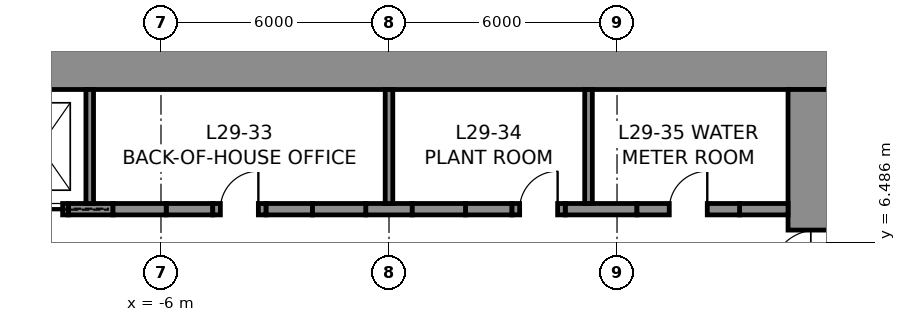
"""IFC4 building model, lengths in metres.
Left out: names, types, materials, properties, quantities, classifications, styles, units other than length and angle.
Written with IfcOpenShell. Run it as: python <this file> out.ifc"""

import sys

from ifc_helpers import new_model, si_unit, direction, frame, frame_2d, origin, place, context, subcontext, project, spatial, rectangle, extrude, element, fill, save


model = new_model("IFC4")
c1 = context("Model", 3, precision=1e-05, world=origin(), true_north=direction((0.0, 1.0)))
c2 = subcontext(c1, "Body", "Model", "MODEL_VIEW")
j1 = project(units=[si_unit("LENGTHUNIT", "METRE"), si_unit("PLANEANGLEUNIT", "RADIAN")], contexts=[c1])
p1 = place(None, origin())
s1 = spatial("IfcSite", under=j1, at=p1, CompositionType="ELEMENT")
p2 = place(p1, origin())
s2 = spatial("IfcBuilding", under=s1, at=p2, CompositionType="ELEMENT")
p3 = place(p2, frame((0.0, 0.0, 143.8)))
s3 = spatial("IfcBuildingStorey", under=s2, at=p3, CompositionType="ELEMENT", Elevation=143.8)
p4 = place(p3, frame((-12.0, 11.25, 0.0), z_axis=(0.0, 0.0, 1.0), x_axis=(1.0, 0.0, 0.0)))
e1 = element("IfcWall", 1, at=p4, inside=s3, PredefinedType="SHEAR", context=c2, shape_type="SweptSolid", body=[
    extrude(rectangle(XDim=24.0, YDim=1.5, at=frame_2d((12.0, 0.0))), origin(), (0.0, 0.0, 1.0), 4.0),
])
p5 = place(p3, frame((11.25, 10.5, 0.0), z_axis=(0.0, 0.0, 1.0), x_axis=(0.0, -1.0, 0.0)))
e2 = element("IfcWall", 2, at=p5, inside=s3, PredefinedType="SHEAR", context=c2, shape_type="SweptSolid", body=[
    extrude(rectangle(XDim=21.0, YDim=1.5, at=frame_2d((10.5, 0.0))), origin(), (0.0, 0.0, 1.0), 4.0),
])
p6 = place(p5, frame((3.7, 0.0, 0.0)))
e3 = element("IfcOpeningElement", 3, at=p6, cuts=e2, PredefinedType="OPENING", context=c2, shape_type="SweptSolid", body=[
    extrude(rectangle(XDim=1.2, YDim=2.3, at=frame_2d((0.6, 1.15))), frame((0.0, 0.76, 0.0), z_axis=(0.0, -1.0, 0.0), x_axis=(1.0, 0.0, 0.0)), (0.0, 0.0, 1.0), 1.52),
])
p7 = place(p5, frame((16.1, 0.0, 0.0)))
e4 = element("IfcOpeningElement", 4, at=p7, cuts=e2, PredefinedType="OPENING", context=c2, shape_type="SweptSolid", body=[
    extrude(rectangle(XDim=1.2, YDim=2.3, at=frame_2d((0.6, 1.15))), frame((0.0, 0.76, 0.0), z_axis=(0.0, -1.0, 0.0), x_axis=(1.0, 0.0, 0.0)), (0.0, 0.0, 1.0), 1.52),
])
p8 = place(p3, frame((-8.438, 7.35, 0.0), z_axis=(0.0, 0.0, 1.0), x_axis=(1.0, 0.0, 0.0)))
e5 = element("IfcWall", 5, at=p8, inside=s3, PredefinedType="SHEAR", context=c2, shape_type="SweptSolid", body=[
    extrude(rectangle(XDim=1.175, YDim=0.3, at=frame_2d((0.587, 0.0))), origin(), (0.0, 0.0, 1.0), 4.0),
])
for number, where, z_axis, x_axis in (
    (6, (-5.863, 7.35, 0.0), (0.0, 0.0, 1.0), (1.0, 0.0, 0.0)),
    (7, (-3.238, 7.35, 0.0), (0.0, 0.0, 1.0), (1.0, 0.0, 0.0)),
    (8, (-0.613, 7.35, 0.0), (0.0, 0.0, 1.0), (1.0, 0.0, 0.0)),
    (9, (2.012, 7.35, 0.0), (0.0, 0.0, 1.0), (1.0, 0.0, 0.0)),
):
    element("IfcWall", number, at=place(p3, frame(where, z_axis=z_axis, x_axis=x_axis)), inside=s3, PredefinedType="SHEAR", context=c2, shape_type="SweptSolid", body=[
        extrude(rectangle(XDim=1.225, YDim=0.3, at=frame_2d((0.613, 0.0))), origin(), (0.0, 0.0, 1.0), 4.0),
    ])
p9 = place(p3, frame((4.637, 7.35, 0.0), z_axis=(0.0, 0.0, 1.0), x_axis=(1.0, 0.0, 0.0)))
e10 = element("IfcWall", 10, at=p9, inside=s3, PredefinedType="SHEAR", context=c2, shape_type="SweptSolid", body=[
    extrude(rectangle(XDim=1.887, YDim=0.3, at=frame_2d((0.944, 0.0))), origin(), (0.0, 0.0, 1.0), 4.0),
])
p10 = place(p3, frame((9.225, 7.35, 0.0), z_axis=(0.0, 0.0, 1.0), x_axis=(1.0, 0.0, 0.0)))
e11 = element("IfcWall", 11, at=p10, inside=s3, PredefinedType="SHEAR", context=c2, shape_type="SweptSolid", body=[
    extrude(rectangle(XDim=1.275, YDim=0.3, at=frame_2d((0.637, 0.0))), origin(), (0.0, 0.0, 1.0), 4.0),
])
p11 = place(p3, frame((-9.938, 7.35, 0.0), z_axis=(0.0, 0.0, 1.0), x_axis=(1.0, 0.0, 0.0)))
e12 = element("IfcWall", 12, at=p11, inside=s3, PredefinedType="PARTITIONING", context=c2, shape_type="SweptSolid", body=[
    extrude(rectangle(XDim=1.5, YDim=0.3, at=frame_2d((0.75, 0.0))), origin(), (0.0, 0.0, 1.0), 4.0),
])
p12 = place(p11, frame((0.15, 0.0, 0.0)))
e13 = element("IfcOpeningElement", 13, at=p12, cuts=e12, PredefinedType="OPENING", context=c2, shape_type="SweptSolid", body=[
    extrude(rectangle(XDim=1.2, YDim=2.3, at=frame_2d((0.6, 1.15))), frame((0.0, 0.16, 0.0), z_axis=(0.0, -1.0, 0.0), x_axis=(1.0, 0.0, 0.0)), (0.0, 0.0, 1.0), 0.32),
])
p13 = place(p3, frame((-7.262, 7.35, 0.0), z_axis=(0.0, 0.0, 1.0), x_axis=(1.0, 0.0, 0.0)))
e14 = element("IfcWall", 14, at=p13, inside=s3, PredefinedType="PARTITIONING", context=c2, shape_type="SweptSolid", body=[
    extrude(rectangle(XDim=1.4, YDim=0.3, at=frame_2d((0.7, 0.0))), origin(), (0.0, 0.0, 1.0), 4.0),
])
p14 = place(p3, frame((-4.637, 7.35, 0.0), z_axis=(0.0, 0.0, 1.0), x_axis=(1.0, 0.0, 0.0)))
e15 = element("IfcWall", 15, at=p14, inside=s3, PredefinedType="PARTITIONING", context=c2, shape_type="SweptSolid", body=[
    extrude(rectangle(XDim=1.4, YDim=0.3, at=frame_2d((0.7, 0.0))), origin(), (0.0, 0.0, 1.0), 4.0),
])
p15 = place(p14, frame((0.2, 0.0, 0.0)))
e16 = element("IfcOpeningElement", 16, at=p15, cuts=e15, PredefinedType="OPENING", context=c2, shape_type="SweptSolid", body=[
    extrude(rectangle(XDim=1.0, YDim=2.3, at=frame_2d((0.5, 1.15))), frame((0.0, 0.16, 0.0), z_axis=(0.0, -1.0, 0.0), x_axis=(1.0, 0.0, 0.0)), (0.0, 0.0, 1.0), 0.32),
])
for number, where, z_axis, x_axis in (
    (17, (-2.012, 7.35, 0.0), (0.0, 0.0, 1.0), (1.0, 0.0, 0.0)),
    (18, (0.613, 7.35, 0.0), (0.0, 0.0, 1.0), (1.0, 0.0, 0.0)),
):
    element("IfcWall", number, at=place(p3, frame(where, z_axis=z_axis, x_axis=x_axis)), inside=s3, PredefinedType="PARTITIONING", context=c2, shape_type="SweptSolid", body=[
        extrude(rectangle(XDim=1.4, YDim=0.3, at=frame_2d((0.7, 0.0))), origin(), (0.0, 0.0, 1.0), 4.0),
    ])
p16 = place(p3, frame((3.238, 7.35, 0.0), z_axis=(0.0, 0.0, 1.0), x_axis=(1.0, 0.0, 0.0)))
e19 = element("IfcWall", 19, at=p16, inside=s3, PredefinedType="PARTITIONING", context=c2, shape_type="SweptSolid", body=[
    extrude(rectangle(XDim=1.4, YDim=0.3, at=frame_2d((0.7, 0.0))), origin(), (0.0, 0.0, 1.0), 4.0),
])
p17 = place(p16, frame((0.2, 0.0, 0.0)))
e20 = element("IfcOpeningElement", 20, at=p17, cuts=e19, PredefinedType="OPENING", context=c2, shape_type="SweptSolid", body=[
    extrude(rectangle(XDim=1.0, YDim=2.3, at=frame_2d((0.5, 1.15))), frame((0.0, 0.16, 0.0), z_axis=(0.0, -1.0, 0.0), x_axis=(1.0, 0.0, 0.0)), (0.0, 0.0, 1.0), 0.32),
])
p18 = place(p3, frame((6.525, 7.35, 0.0), z_axis=(0.0, 0.0, 1.0), x_axis=(1.0, 0.0, 0.0)))
e21 = element("IfcWall", 21, at=p18, inside=s3, PredefinedType="PARTITIONING", context=c2, shape_type="SweptSolid", body=[
    extrude(rectangle(XDim=2.7, YDim=0.3, at=frame_2d((1.35, 0.0))), origin(), (0.0, 0.0, 1.0), 4.0),
])
p19 = place(p18, frame((0.85, 0.0, 0.0)))
e22 = element("IfcOpeningElement", 22, at=p19, cuts=e21, PredefinedType="OPENING", context=c2, shape_type="SweptSolid", body=[
    extrude(rectangle(XDim=1.0, YDim=2.3, at=frame_2d((0.5, 1.15))), frame((0.0, 0.16, 0.0), z_axis=(0.0, -1.0, 0.0), x_axis=(1.0, 0.0, 0.0)), (0.0, 0.0, 1.0), 0.32),
])
for number, where, z_axis, x_axis in (
    (23, (-7.875, 7.5, 0.0), (0.0, 0.0, 1.0), (0.0, 1.0, 0.0)),
    (24, (0.0, 7.5, 0.0), (0.0, 0.0, 1.0), (0.0, 1.0, 0.0)),
    (25, (5.25, 7.5, 0.0), (0.0, 0.0, 1.0), (0.0, 1.0, 0.0)),
):
    element("IfcWall", number, at=place(p3, frame(where, z_axis=z_axis, x_axis=x_axis)), inside=s3, PredefinedType="PARTITIONING", context=c2, shape_type="SweptSolid", body=[
        extrude(rectangle(XDim=3.0, YDim=0.2, at=frame_2d((1.5, 0.0))), origin(), (0.0, 0.0, 1.0), 4.0),
    ])
p20 = place(p15, origin())
e26 = element("IfcDoor", 26, at=p20, inside=s3, OperationType="SINGLE_SWING_RIGHT", PredefinedType="DOOR", context=c2, shape_type="SweptSolid", body=[
    extrude(rectangle(XDim=1.0, YDim=2.3, at=frame_2d((0.5, 1.15))), frame((0.0, 0.025, 0.0), z_axis=(0.0, -1.0, 0.0), x_axis=(1.0, 0.0, 0.0)), (0.0, 0.0, 1.0), 0.05),
])
fill(e16, e26)
p21 = place(p17, origin())
e27 = element("IfcDoor", 27, at=p21, inside=s3, OperationType="SINGLE_SWING_RIGHT", PredefinedType="DOOR", context=c2, shape_type="SweptSolid", body=[
    extrude(rectangle(XDim=1.0, YDim=2.3, at=frame_2d((0.5, 1.15))), frame((0.0, 0.025, 0.0), z_axis=(0.0, -1.0, 0.0), x_axis=(1.0, 0.0, 0.0)), (0.0, 0.0, 1.0), 0.05),
])
fill(e20, e27)
p22 = place(p19, origin())
e28 = element("IfcDoor", 28, at=p22, inside=s3, OperationType="SINGLE_SWING_RIGHT", PredefinedType="DOOR", context=c2, shape_type="SweptSolid", body=[
    extrude(rectangle(XDim=1.0, YDim=2.3, at=frame_2d((0.5, 1.15))), frame((0.0, 0.025, 0.0), z_axis=(0.0, -1.0, 0.0), x_axis=(1.0, 0.0, 0.0)), (0.0, 0.0, 1.0), 0.05),
])
fill(e22, e28)
p23 = place(p6, frame((1.2, 0.0, 0.0), z_axis=(0.0, 0.0, 1.0), x_axis=(-1.0, 0.0, 0.0)))
e29 = element("IfcDoor", 29, at=p23, inside=s3, OperationType="SINGLE_SWING_LEFT", PredefinedType="DOOR", context=c2, shape_type="SweptSolid", body=[
    extrude(rectangle(XDim=1.2, YDim=2.3, at=frame_2d((0.6, 1.15))), frame((0.0, 0.025, 0.0), z_axis=(0.0, -1.0, 0.0), x_axis=(1.0, 0.0, 0.0)), (0.0, 0.0, 1.0), 0.05),
])
fill(e3, e29)
p24 = place(p12, frame((1.2, 0.0, 0.0), z_axis=(0.0, 0.0, 1.0), x_axis=(-1.0, 0.0, 0.0)))
e30 = element("IfcDoor", 30, at=p24, inside=s3, OperationType="SLIDING_TO_LEFT", PredefinedType="DOOR", context=c2, shape_type="SweptSolid", body=[
    extrude(rectangle(XDim=1.2, YDim=2.3, at=frame_2d((0.6, 1.15))), frame((0.0, 0.025, 0.0), z_axis=(0.0, -1.0, 0.0), x_axis=(1.0, 0.0, 0.0)), (0.0, 0.0, 1.0), 0.05),
])
fill(e13, e30)
save(model, sys.argv[1])
